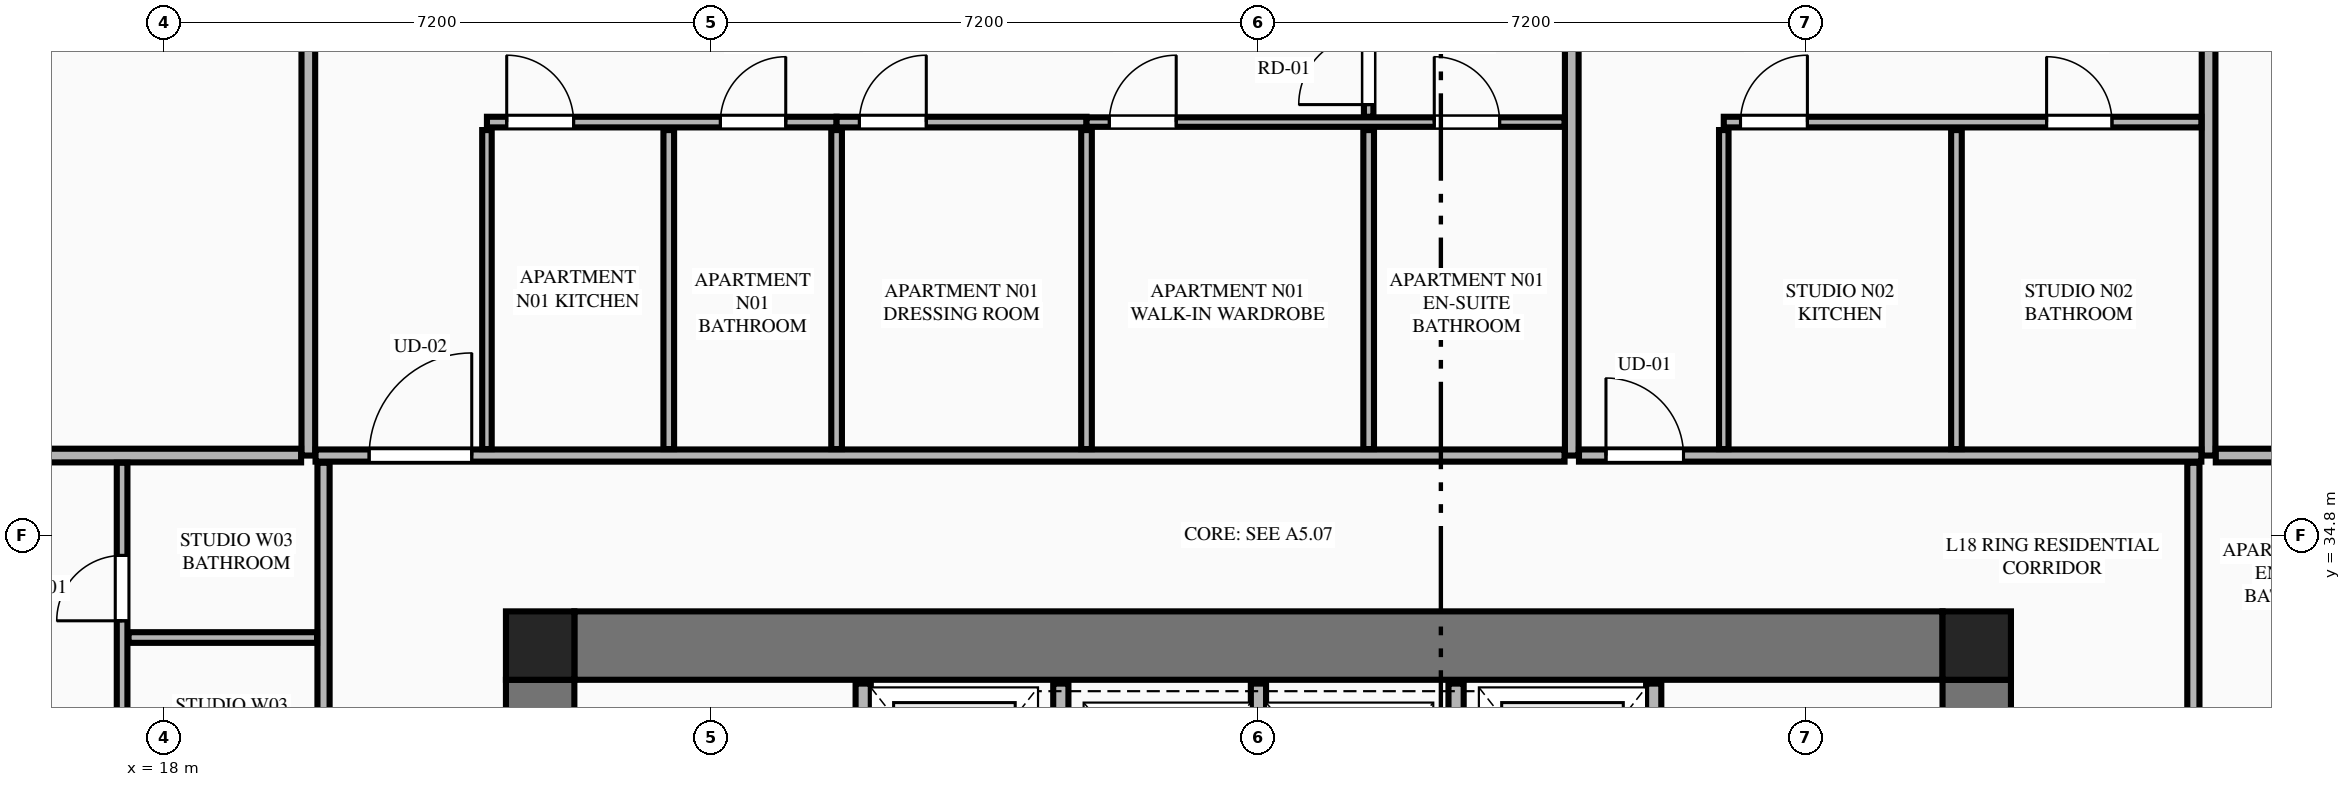
"""IFC4 building model, lengths in metres.
Left out: names, types, materials, properties, quantities, classifications, styles, units other than length and angle.
Written with IfcOpenShell. Run it as: python <this file> out.ifc"""

import sys

from ifc_helpers import new_model, si_unit, direction, frame, frame_2d, origin, origin_2d, place, context, subcontext, project, spatial, rectangle, extrude, element, fill, save


model = new_model("IFC4")
c1 = context("Model", 3, precision=1e-05, world=origin(), true_north=direction((0.0, 1.0)))
c2 = subcontext(c1, "Body", "Model", "MODEL_VIEW")
j1 = project(units=[si_unit("LENGTHUNIT", "METRE"), si_unit("PLANEANGLEUNIT", "RADIAN")], contexts=[c1])
p1 = place(None, origin())
s1 = spatial("IfcSite", under=j1, at=p1, CompositionType="ELEMENT")
p2 = place(p1, origin())
s2 = spatial("IfcBuilding", under=s1, at=p2, CompositionType="ELEMENT")
p3 = place(p2, frame((0.0, 0.0, 71.05)))
s3 = spatial("IfcBuildingStorey", under=s2, at=p3, CompositionType="ELEMENT", Elevation=71.05)
for number, where, z_axis, x_axis in (
    (1, (41.85, 33.35, 0.0), (0.0, 0.0, 1.0), (1.0, 0.0, 0.0)),
    (2, (22.95, 33.35, 0.0), (0.0, 0.0, 1.0), (1.0, 0.0, 0.0)),
):
    element("IfcColumn", number, at=place(p3, frame(where, z_axis=z_axis, x_axis=x_axis)), inside=s3, PredefinedType="COLUMN", context=c2, shape_type="SweptSolid", body=[
        extrude(rectangle(XDim=0.9, YDim=0.9, at=origin_2d()), origin(), (0.0, 0.0, 1.0), 3.55),
    ])
p4 = place(p3, frame((23.4, 33.35, 0.0), z_axis=(0.0, 0.0, 1.0), x_axis=(1.0, 0.0, 0.0)))
e3 = element("IfcWall", 3, at=p4, inside=s3, PredefinedType="SHEAR", context=c2, shape_type="SweptSolid", body=[
    extrude(rectangle(XDim=18.0, YDim=0.9, at=frame_2d((9.0, 0.0))), origin(), (0.0, 0.0, 1.0), 3.27),
])
p5 = place(p3, frame((22.95, 18.9, 0.0), z_axis=(0.0, 0.0, 1.0), x_axis=(0.0, 1.0, 0.0)))
e4 = element("IfcWall", 4, at=p5, inside=s3, PredefinedType="SHEAR", context=c2, shape_type="SweptSolid", body=[
    extrude(rectangle(XDim=14.0, YDim=0.9, at=frame_2d((7.0, 0.0))), origin(), (0.0, 0.0, 1.0), 3.27),
])
p6 = place(p5, frame((2.94, 0.0, 0.0)))
e5 = element("IfcOpeningElement", 5, at=p6, cuts=e4, PredefinedType="OPENING", context=c2, shape_type="SweptSolid", body=[
    extrude(rectangle(XDim=1.22, YDim=2.25, at=frame_2d((0.61, 1.125))), frame((0.0, 0.46, 0.0), z_axis=(0.0, -1.0, 0.0), x_axis=(1.0, 0.0, 0.0)), (0.0, 0.0, 1.0), 0.92),
])
p7 = place(p3, frame((41.85, 18.9, 0.0), z_axis=(0.0, 0.0, 1.0), x_axis=(0.0, 1.0, 0.0)))
e6 = element("IfcWall", 6, at=p7, inside=s3, PredefinedType="SHEAR", context=c2, shape_type="SweptSolid", body=[
    extrude(rectangle(XDim=14.0, YDim=0.9, at=frame_2d((7.0, 0.0))), origin(), (0.0, 0.0, 1.0), 3.27),
])
p8 = place(p7, frame((2.94, 0.0, 0.0)))
e7 = element("IfcOpeningElement", 7, at=p8, cuts=e6, PredefinedType="OPENING", context=c2, shape_type="SweptSolid", body=[
    extrude(rectangle(XDim=1.22, YDim=2.25, at=frame_2d((0.61, 1.125))), frame((0.0, 0.46, 0.0), z_axis=(0.0, -1.0, 0.0), x_axis=(1.0, 0.0, 0.0)), (0.0, 0.0, 1.0), 0.92),
])
for number, where, z_axis, x_axis in (
    (8, (27.2, 30.0, 0.0), (0.0, 0.0, 1.0), (0.0, 1.0, 0.0)),
    (9, (29.8, 30.0, 0.0), (0.0, 0.0, 1.0), (0.0, 1.0, 0.0)),
    (10, (32.4, 30.0, 0.0), (0.0, 0.0, 1.0), (0.0, 1.0, 0.0)),
    (11, (35.0, 30.0, 0.0), (0.0, 0.0, 1.0), (0.0, 1.0, 0.0)),
    (12, (37.6, 30.0, 0.0), (0.0, 0.0, 1.0), (0.0, 1.0, 0.0)),
):
    element("IfcWall", number, at=place(p3, frame(where, z_axis=z_axis, x_axis=x_axis)), inside=s3, PredefinedType="PLUMBINGWALL", context=c2, shape_type="SweptSolid", body=[
        extrude(rectangle(XDim=2.85, YDim=0.2, at=frame_2d((1.425, 0.0))), origin(), (0.0, 0.0, 1.0), 3.27),
    ])
p9 = place(p3, frame((19.9, 35.85, 0.0), z_axis=(0.0, 0.0, 1.0), x_axis=(0.0, 1.0, 0.0)))
e13 = element("IfcWall", 13, at=p9, inside=s3, PredefinedType="PARTITIONING", context=c2, shape_type="SweptSolid", body=[
    extrude(rectangle(XDim=13.295, YDim=0.18, at=frame_2d((6.647, 0.0))), origin(), (0.0, 0.0, 1.0), 3.27),
])
p10 = place(p3, frame((36.522, 35.85, 0.0), z_axis=(0.0, 0.0, 1.0), x_axis=(0.0, 1.0, 0.0)))
e14 = element("IfcWall", 14, at=p10, inside=s3, PredefinedType="PARTITIONING", context=c2, shape_type="SweptSolid", body=[
    extrude(rectangle(XDim=13.295, YDim=0.18, at=frame_2d((6.647, 0.0))), origin(), (0.0, 0.0, 1.0), 2.64),
])
p11 = place(p3, frame((44.9, 35.85, 0.0), z_axis=(0.0, 0.0, 1.0), x_axis=(0.0, 1.0, 0.0)))
e15 = element("IfcWall", 15, at=p11, inside=s3, PredefinedType="PARTITIONING", context=c2, shape_type="SweptSolid", body=[
    extrude(rectangle(XDim=13.295, YDim=0.18, at=frame_2d((6.647, 0.0))), origin(), (0.0, 0.0, 1.0), 3.27),
])
p12 = place(p3, frame((19.995, 35.85, 0.0), z_axis=(0.0, 0.0, 1.0), x_axis=(1.0, 0.0, 0.0)))
e16 = element("IfcWall", 16, at=p12, inside=s3, PredefinedType="PARTITIONING", context=c2, shape_type="SweptSolid", body=[
    extrude(rectangle(XDim=16.432, YDim=0.16, at=frame_2d((8.216, 0.0))), origin(), (0.0, 0.0, 1.0), 3.27),
])
p13 = place(p12, frame((0.705, 0.0, 0.0)))
e17 = element("IfcOpeningElement", 17, at=p13, cuts=e16, PredefinedType="OPENING", context=c2, shape_type="SweptSolid", body=[
    extrude(rectangle(XDim=1.35, YDim=2.35, at=frame_2d((0.675, 1.175))), frame((0.0, 0.09, 0.0), z_axis=(0.0, -1.0, 0.0), x_axis=(1.0, 0.0, 0.0)), (0.0, 0.0, 1.0), 0.18),
])
p14 = place(p3, frame((22.25, 35.935, 0.0), z_axis=(0.0, 0.0, 1.0), x_axis=(0.0, 1.0, 0.0)))
e18 = element("IfcWall", 18, at=p14, inside=s3, PredefinedType="PARTITIONING", context=c2, shape_type="SweptSolid", body=[
    extrude(rectangle(XDim=4.197, YDim=0.125, at=frame_2d((2.099, 0.0))), origin(), (0.0, 0.0, 1.0), 2.64),
])
p15 = place(p3, frame((22.25, 40.237, 0.0), z_axis=(0.0, 0.0, 1.0), x_axis=(1.0, 0.0, 0.0)))
e19 = element("IfcWall", 19, at=p15, inside=s3, PredefinedType="PLUMBINGWALL", context=c2, shape_type="SweptSolid", body=[
    extrude(rectangle(XDim=4.6, YDim=0.14, at=frame_2d((2.3, 0.0))), origin(), (0.0, 0.0, 1.0), 3.27),
])
p16 = place(p15, frame((3.071, 0.0, 0.0)))
e20 = element("IfcOpeningElement", 20, at=p16, cuts=e19, PredefinedType="OPENING", context=c2, shape_type="SweptSolid", body=[
    extrude(rectangle(XDim=0.86, YDim=2.1, at=frame_2d((0.43, 1.05))), frame((0.0, 0.08, 0.0), z_axis=(0.0, -1.0, 0.0), x_axis=(1.0, 0.0, 0.0)), (0.0, 0.0, 1.0), 0.16),
])
p17 = place(p15, frame((0.26, 0.0, 0.0)))
e21 = element("IfcOpeningElement", 21, at=p17, cuts=e19, PredefinedType="OPENING", context=c2, shape_type="SweptSolid", body=[
    extrude(rectangle(XDim=0.88, YDim=2.15, at=frame_2d((0.44, 1.075))), frame((0.0, 0.08, 0.0), z_axis=(0.0, -1.0, 0.0), x_axis=(1.0, 0.0, 0.0)), (0.0, 0.0, 1.0), 0.16),
])
p18 = place(p3, frame((26.85, 40.237, 0.0), z_axis=(0.0, 0.0, 1.0), x_axis=(1.0, 0.0, 0.0)))
e22 = element("IfcWall", 22, at=p18, inside=s3, PredefinedType="PLUMBINGWALL", context=c2, shape_type="SweptSolid", body=[
    extrude(rectangle(XDim=3.288, YDim=0.14, at=frame_2d((1.644, 0.0))), origin(), (0.0, 0.0, 1.0), 3.27),
])
p19 = place(p18, frame((0.3, 0.0, 0.0)))
e23 = element("IfcOpeningElement", 23, at=p19, cuts=e22, PredefinedType="OPENING", context=c2, shape_type="SweptSolid", body=[
    extrude(rectangle(XDim=0.88, YDim=2.15, at=frame_2d((0.44, 1.075))), frame((0.0, 0.08, 0.0), z_axis=(0.0, -1.0, 0.0), x_axis=(1.0, 0.0, 0.0)), (0.0, 0.0, 1.0), 0.16),
])
p20 = place(p3, frame((30.138, 40.237, 0.0), z_axis=(0.0, 0.0, 1.0), x_axis=(1.0, 0.0, 0.0)))
e24 = element("IfcWall", 24, at=p20, inside=s3, PredefinedType="PARTITIONING", context=c2, shape_type="SweptSolid", body=[
    extrude(rectangle(XDim=6.289, YDim=0.125, at=frame_2d((3.145, 0.0))), origin(), (0.0, 0.0, 1.0), 3.27),
])
p21 = place(p20, frame((4.575, 0.0, 0.0)))
e25 = element("IfcOpeningElement", 25, at=p21, cuts=e24, PredefinedType="OPENING", context=c2, shape_type="SweptSolid", body=[
    extrude(rectangle(XDim=0.86, YDim=2.1, at=frame_2d((0.43, 1.05))), frame((0.0, 0.073, 0.0), z_axis=(0.0, -1.0, 0.0), x_axis=(1.0, 0.0, 0.0)), (0.0, 0.0, 1.0), 0.145),
])
p22 = place(p20, frame((0.3, 0.0, 0.0)))
e26 = element("IfcOpeningElement", 26, at=p22, cuts=e24, PredefinedType="OPENING", context=c2, shape_type="SweptSolid", body=[
    extrude(rectangle(XDim=0.88, YDim=2.15, at=frame_2d((0.44, 1.075))), frame((0.0, 0.073, 0.0), z_axis=(0.0, -1.0, 0.0), x_axis=(1.0, 0.0, 0.0)), (0.0, 0.0, 1.0), 0.145),
])
p23 = place(p3, frame((24.642, 35.935, 0.0), z_axis=(0.0, 0.0, 1.0), x_axis=(0.0, 1.0, 0.0)))
e27 = element("IfcWall", 27, at=p23, inside=s3, PredefinedType="PLUMBINGWALL", context=c2, shape_type="SweptSolid", body=[
    extrude(rectangle(XDim=4.197, YDim=0.14, at=frame_2d((2.099, 0.0))), origin(), (0.0, 0.0, 1.0), 3.27),
])
p24 = place(p3, frame((33.85, 40.307, 0.0), z_axis=(0.0, 0.0, 1.0), x_axis=(0.0, 1.0, 0.0)))
e28 = element("IfcWall", 28, at=p24, inside=s3, PredefinedType="PARTITIONING", context=c2, shape_type="SweptSolid", body=[
    extrude(rectangle(XDim=1.33, YDim=0.125, at=frame_2d((0.665, 0.0))), origin(), (0.0, 0.0, 1.0), 3.27),
])
p25 = place(p24, frame((0.16, 0.0, 0.0)))
e29 = element("IfcOpeningElement", 29, at=p25, cuts=e28, PredefinedType="OPENING", context=c2, shape_type="SweptSolid", body=[
    extrude(rectangle(XDim=0.92, YDim=2.15, at=frame_2d((0.46, 1.075))), frame((0.0, 0.073, 0.0), z_axis=(0.0, -1.0, 0.0), x_axis=(1.0, 0.0, 0.0)), (0.0, 0.0, 1.0), 0.145),
])
for number, where, z_axis, x_axis in (
    (30, (26.85, 35.935, 0.0), (0.0, 0.0, 1.0), (0.0, 1.0, 0.0)),
    (31, (30.138, 35.935, 0.0), (0.0, 0.0, 1.0), (0.0, 1.0, 0.0)),
    (32, (33.85, 35.935, 0.0), (0.0, 0.0, 1.0), (0.0, 1.0, 0.0)),
):
    element("IfcWall", number, at=place(p3, frame(where, z_axis=z_axis, x_axis=x_axis)), inside=s3, PredefinedType="PLUMBINGWALL", context=c2, shape_type="SweptSolid", body=[
        extrude(rectangle(XDim=4.197, YDim=0.14, at=frame_2d((2.099, 0.0))), origin(), (0.0, 0.0, 1.0), 3.27),
    ])
p26 = place(p3, frame((36.617, 35.85, 0.0), z_axis=(0.0, 0.0, 1.0), x_axis=(1.0, 0.0, 0.0)))
e33 = element("IfcWall", 33, at=p26, inside=s3, PredefinedType="PARTITIONING", context=c2, shape_type="SweptSolid", body=[
    extrude(rectangle(XDim=8.188, YDim=0.16, at=frame_2d((4.094, 0.0))), origin(), (0.0, 0.0, 1.0), 3.27),
])
p27 = place(p26, frame((0.355, 0.0, 0.0)))
e34 = element("IfcOpeningElement", 34, at=p27, cuts=e33, PredefinedType="OPENING", context=c2, shape_type="SweptSolid", body=[
    extrude(rectangle(XDim=1.02, YDim=2.25, at=frame_2d((0.51, 1.125))), frame((0.0, 0.09, 0.0), z_axis=(0.0, -1.0, 0.0), x_axis=(1.0, 0.0, 0.0)), (0.0, 0.0, 1.0), 0.18),
])
p28 = place(p3, frame((38.522, 35.935, 0.0), z_axis=(0.0, 0.0, 1.0), x_axis=(0.0, 1.0, 0.0)))
e35 = element("IfcWall", 35, at=p28, inside=s3, PredefinedType="PARTITIONING", context=c2, shape_type="SweptSolid", body=[
    extrude(rectangle(XDim=4.197, YDim=0.125, at=frame_2d((2.099, 0.0))), origin(), (0.0, 0.0, 1.0), 3.27),
])
p29 = place(p3, frame((38.522, 40.237, 0.0), z_axis=(0.0, 0.0, 1.0), x_axis=(1.0, 0.0, 0.0)))
e36 = element("IfcWall", 36, at=p29, inside=s3, PredefinedType="PLUMBINGWALL", context=c2, shape_type="SweptSolid", body=[
    extrude(rectangle(XDim=6.283, YDim=0.14, at=frame_2d((3.142, 0.0))), origin(), (0.0, 0.0, 1.0), 3.27),
])
p30 = place(p29, frame((4.247, 0.0, 0.0)))
e37 = element("IfcOpeningElement", 37, at=p30, cuts=e36, PredefinedType="OPENING", context=c2, shape_type="SweptSolid", body=[
    extrude(rectangle(XDim=0.86, YDim=2.1, at=frame_2d((0.43, 1.05))), frame((0.0, 0.08, 0.0), z_axis=(0.0, -1.0, 0.0), x_axis=(1.0, 0.0, 0.0)), (0.0, 0.0, 1.0), 0.16),
])
p31 = place(p29, frame((0.22, 0.0, 0.0)))
e38 = element("IfcOpeningElement", 38, at=p31, cuts=e36, PredefinedType="OPENING", context=c2, shape_type="SweptSolid", body=[
    extrude(rectangle(XDim=0.88, YDim=2.15, at=frame_2d((0.44, 1.075))), frame((0.0, 0.08, 0.0), z_axis=(0.0, -1.0, 0.0), x_axis=(1.0, 0.0, 0.0)), (0.0, 0.0, 1.0), 0.16),
])
p32 = place(p3, frame((41.583, 35.935, 0.0), z_axis=(0.0, 0.0, 1.0), x_axis=(0.0, 1.0, 0.0)))
e39 = element("IfcWall", 39, at=p32, inside=s3, PredefinedType="PLUMBINGWALL", context=c2, shape_type="SweptSolid", body=[
    extrude(rectangle(XDim=4.197, YDim=0.14, at=frame_2d((2.099, 0.0))), origin(), (0.0, 0.0, 1.0), 3.27),
])
for number, where, z_axis, x_axis in (
    (40, (10.665, 35.85, 0.0), (0.0, 0.0, 1.0), (1.0, 0.0, 0.0)),
    (41, (44.995, 35.85, 0.0), (0.0, 0.0, 1.0), (1.0, 0.0, 0.0)),
):
    element("IfcWall", number, at=place(p3, frame(where, z_axis=z_axis, x_axis=x_axis)), inside=s3, PredefinedType="PARTITIONING", context=c2, shape_type="SweptSolid", body=[
        extrude(rectangle(XDim=9.14, YDim=0.18, at=frame_2d((4.57, 0.0))), origin(), (0.0, 0.0, 1.0), 3.27),
    ])
p33 = place(p3, frame((20.1, 29.378, 0.0), z_axis=(0.0, 0.0, 1.0), x_axis=(0.0, 1.0, 0.0)))
e42 = element("IfcWall", 42, at=p33, inside=s3, PredefinedType="PARTITIONING", context=c2, shape_type="SweptSolid", body=[
    extrude(rectangle(XDim=6.377, YDim=0.16, at=frame_2d((3.188, 0.0))), origin(), (0.0, 0.0, 1.0), 2.64),
])
p34 = place(p33, frame((0.4, 0.0, 0.0)))
e43 = element("IfcOpeningElement", 43, at=p34, cuts=e42, PredefinedType="OPENING", context=c2, shape_type="SweptSolid", body=[
    extrude(rectangle(XDim=1.02, YDim=2.25, at=frame_2d((0.51, 1.125))), frame((0.0, 0.09, 0.0), z_axis=(0.0, -1.0, 0.0), x_axis=(1.0, 0.0, 0.0)), (0.0, 0.0, 1.0), 0.18),
])
p35 = place(p3, frame((17.45, 31.333, 0.0), z_axis=(0.0, 0.0, 1.0), x_axis=(0.0, 1.0, 0.0)))
e44 = element("IfcWall", 44, at=p35, inside=s3, PredefinedType="PLUMBINGWALL", context=c2, shape_type="SweptSolid", body=[
    extrude(rectangle(XDim=4.422, YDim=0.14, at=frame_2d((2.211, 0.0))), origin(), (0.0, 0.0, 1.0), 3.27),
])
p36 = place(p35, frame((2.343, 0.0, 0.0)))
e45 = element("IfcOpeningElement", 45, at=p36, cuts=e44, PredefinedType="OPENING", context=c2, shape_type="SweptSolid", body=[
    extrude(rectangle(XDim=0.86, YDim=2.1, at=frame_2d((0.43, 1.05))), frame((0.0, 0.08, 0.0), z_axis=(0.0, -1.0, 0.0), x_axis=(1.0, 0.0, 0.0)), (0.0, 0.0, 1.0), 0.16),
])
p37 = place(p35, frame((0.2, 0.0, 0.0)))
e46 = element("IfcOpeningElement", 46, at=p37, cuts=e44, PredefinedType="OPENING", context=c2, shape_type="SweptSolid", body=[
    extrude(rectangle(XDim=0.88, YDim=2.15, at=frame_2d((0.44, 1.075))), frame((0.0, 0.08, 0.0), z_axis=(0.0, -1.0, 0.0), x_axis=(1.0, 0.0, 0.0)), (0.0, 0.0, 1.0), 0.16),
])
p38 = place(p3, frame((17.535, 33.456, 0.0), z_axis=(0.0, 0.0, 1.0), x_axis=(1.0, 0.0, 0.0)))
e47 = element("IfcWall", 47, at=p38, inside=s3, PredefinedType="PLUMBINGWALL", context=c2, shape_type="SweptSolid", body=[
    extrude(rectangle(XDim=2.48, YDim=0.14, at=frame_2d((1.24, 0.0))), origin(), (0.0, 0.0, 1.0), 2.64),
])
p39 = place(p3, frame((44.7, 25.0, 0.0), z_axis=(0.0, 0.0, 1.0), x_axis=(0.0, 1.0, 0.0)))
e48 = element("IfcWall", 48, at=p39, inside=s3, PredefinedType="PARTITIONING", context=c2, shape_type="SweptSolid", body=[
    extrude(rectangle(XDim=10.755, YDim=0.16, at=frame_2d((5.377, 0.0))), origin(), (0.0, 0.0, 1.0), 2.64),
])
p40 = place(p39, frame((0.45, 0.0, 0.0)))
e49 = element("IfcOpeningElement", 49, at=p40, cuts=e48, PredefinedType="OPENING", context=c2, shape_type="SweptSolid", body=[
    extrude(rectangle(XDim=1.02, YDim=2.25, at=frame_2d((0.51, 1.125))), frame((0.0, 0.09, 0.0), z_axis=(0.0, -1.0, 0.0), x_axis=(1.0, 0.0, 0.0)), (0.0, 0.0, 1.0), 0.18),
])
p41 = place(p16, origin())
e50 = element("IfcDoor", 50, at=p41, inside=s3, OperationType="SINGLE_SWING_RIGHT", PredefinedType="DOOR", context=c2, shape_type="SweptSolid", body=[
    extrude(rectangle(XDim=0.86, YDim=2.1, at=frame_2d((0.43, 1.05))), frame((0.0, 0.025, 0.0), z_axis=(0.0, -1.0, 0.0), x_axis=(1.0, 0.0, 0.0)), (0.0, 0.0, 1.0), 0.05),
])
fill(e20, e50)
p42 = place(p21, origin())
e51 = element("IfcDoor", 51, at=p42, inside=s3, OperationType="SINGLE_SWING_LEFT", PredefinedType="DOOR", context=c2, shape_type="SweptSolid", body=[
    extrude(rectangle(XDim=0.86, YDim=2.1, at=frame_2d((0.43, 1.05))), frame((0.0, 0.025, 0.0), z_axis=(0.0, -1.0, 0.0), x_axis=(1.0, 0.0, 0.0)), (0.0, 0.0, 1.0), 0.05),
])
fill(e25, e51)
p43 = place(p13, origin())
e52 = element("IfcDoor", 52, at=p43, inside=s3, OperationType="SINGLE_SWING_RIGHT", PredefinedType="DOOR", context=c2, shape_type="SweptSolid", body=[
    extrude(rectangle(XDim=1.35, YDim=2.35, at=frame_2d((0.675, 1.175))), frame((0.0, 0.025, 0.0), z_axis=(0.0, -1.0, 0.0), x_axis=(1.0, 0.0, 0.0)), (0.0, 0.0, 1.0), 0.05),
])
fill(e17, e52)
p44 = place(p17, origin())
e53 = element("IfcDoor", 53, at=p44, inside=s3, OperationType="SINGLE_SWING_LEFT", PredefinedType="DOOR", context=c2, shape_type="SweptSolid", body=[
    extrude(rectangle(XDim=0.88, YDim=2.15, at=frame_2d((0.44, 1.075))), frame((0.0, 0.025, 0.0), z_axis=(0.0, -1.0, 0.0), x_axis=(1.0, 0.0, 0.0)), (0.0, 0.0, 1.0), 0.05),
])
fill(e21, e53)
p45 = place(p19, origin())
e54 = element("IfcDoor", 54, at=p45, inside=s3, OperationType="SINGLE_SWING_RIGHT", PredefinedType="DOOR", context=c2, shape_type="SweptSolid", body=[
    extrude(rectangle(XDim=0.88, YDim=2.15, at=frame_2d((0.44, 1.075))), frame((0.0, 0.025, 0.0), z_axis=(0.0, -1.0, 0.0), x_axis=(1.0, 0.0, 0.0)), (0.0, 0.0, 1.0), 0.05),
])
fill(e23, e54)
p46 = place(p25, origin())
e55 = element("IfcDoor", 55, at=p46, inside=s3, OperationType="SINGLE_SWING_LEFT", PredefinedType="DOOR", context=c2, shape_type="SweptSolid", body=[
    extrude(rectangle(XDim=0.92, YDim=2.15, at=frame_2d((0.46, 1.075))), frame((0.0, 0.025, 0.0), z_axis=(0.0, -1.0, 0.0), x_axis=(1.0, 0.0, 0.0)), (0.0, 0.0, 1.0), 0.05),
])
fill(e29, e55)
p47 = place(p22, origin())
e56 = element("IfcDoor", 56, at=p47, inside=s3, OperationType="SINGLE_SWING_RIGHT", PredefinedType="DOOR", context=c2, shape_type="SweptSolid", body=[
    extrude(rectangle(XDim=0.88, YDim=2.15, at=frame_2d((0.44, 1.075))), frame((0.0, 0.025, 0.0), z_axis=(0.0, -1.0, 0.0), x_axis=(1.0, 0.0, 0.0)), (0.0, 0.0, 1.0), 0.05),
])
fill(e26, e56)
p48 = place(p30, origin())
e57 = element("IfcDoor", 57, at=p48, inside=s3, OperationType="SINGLE_SWING_LEFT", PredefinedType="DOOR", context=c2, shape_type="SweptSolid", body=[
    extrude(rectangle(XDim=0.86, YDim=2.1, at=frame_2d((0.43, 1.05))), frame((0.0, 0.025, 0.0), z_axis=(0.0, -1.0, 0.0), x_axis=(1.0, 0.0, 0.0)), (0.0, 0.0, 1.0), 0.05),
])
fill(e37, e57)
p49 = place(p27, origin())
e58 = element("IfcDoor", 58, at=p49, inside=s3, OperationType="SINGLE_SWING_LEFT", PredefinedType="DOOR", context=c2, shape_type="SweptSolid", body=[
    extrude(rectangle(XDim=1.02, YDim=2.25, at=frame_2d((0.51, 1.125))), frame((0.0, 0.025, 0.0), z_axis=(0.0, -1.0, 0.0), x_axis=(1.0, 0.0, 0.0)), (0.0, 0.0, 1.0), 0.05),
])
fill(e34, e58)
p50 = place(p31, origin())
e59 = element("IfcDoor", 59, at=p50, inside=s3, OperationType="SINGLE_SWING_RIGHT", PredefinedType="DOOR", context=c2, shape_type="SweptSolid", body=[
    extrude(rectangle(XDim=0.88, YDim=2.15, at=frame_2d((0.44, 1.075))), frame((0.0, 0.025, 0.0), z_axis=(0.0, -1.0, 0.0), x_axis=(1.0, 0.0, 0.0)), (0.0, 0.0, 1.0), 0.05),
])
fill(e38, e59)
p51 = place(p36, origin())
e60 = element("IfcDoor", 60, at=p51, inside=s3, OperationType="SINGLE_SWING_LEFT", PredefinedType="DOOR", context=c2, shape_type="SweptSolid", body=[
    extrude(rectangle(XDim=0.86, YDim=2.1, at=frame_2d((0.43, 1.05))), frame((0.0, 0.025, 0.0), z_axis=(0.0, -1.0, 0.0), x_axis=(1.0, 0.0, 0.0)), (0.0, 0.0, 1.0), 0.05),
])
fill(e45, e60)
save(model, sys.argv[1])
